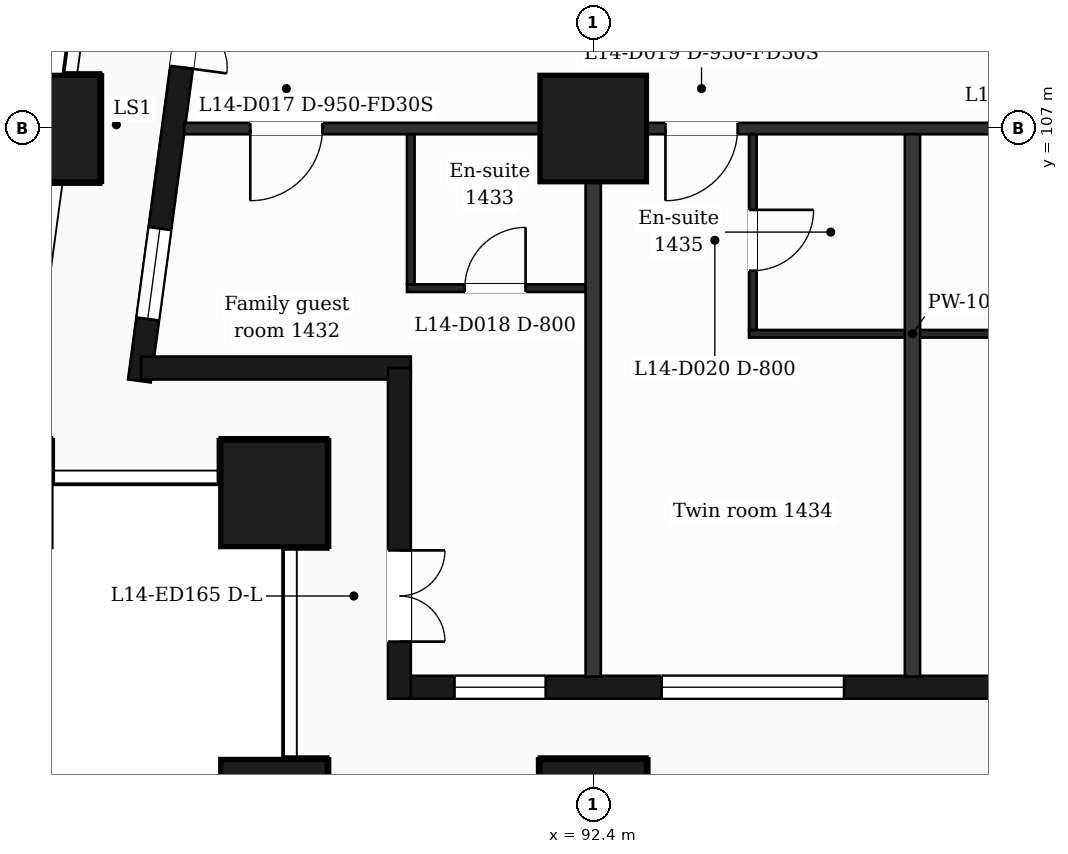
"""IFC4 building model, lengths in metres.
Left out: names, types, materials, properties, quantities, classifications, styles, units other than length and angle.
Written with IfcOpenShell. Run it as: python <this file> out.ifc"""

import sys

from ifc_helpers import new_model, si_unit, direction, frame, frame_2d, origin, origin_2d, place, context, subcontext, project, spatial, rectangle, extrude, element, fill, save


model = new_model("IFC4")
c1 = context("Model", 3, precision=1e-05, world=origin(), true_north=direction((0.0, 1.0)))
c2 = subcontext(c1, "Body", "Model", "MODEL_VIEW")
j1 = project(units=[si_unit("LENGTHUNIT", "METRE"), si_unit("PLANEANGLEUNIT", "RADIAN")], contexts=[c1])
p1 = place(None, origin())
s1 = spatial("IfcSite", under=j1, at=p1, CompositionType="ELEMENT")
p2 = place(p1, origin())
s2 = spatial("IfcBuilding", under=s1, at=p2, CompositionType="ELEMENT")
p3 = place(p2, frame((0.0, 0.0, 67.0)))
s3 = spatial("IfcBuildingStorey", under=s2, at=p3, CompositionType="ELEMENT", Elevation=67.0)
for number, where, z_axis, x_axis in (
    (1, (92.4, 98.0, 0.0), (0.0, 0.0, 1.0), (1.0, 0.0, 0.0)),
    (2, (88.2, 98.0, 0.0), (0.0, 0.0, 1.0), (1.0, 0.0, 0.0)),
    (3, (88.2, 102.2, 0.0), (0.0, 0.0, 1.0), (1.0, 0.0, 0.0)),
    (4, (92.4, 107.0, 0.0), (0.0, 0.0, 1.0), (1.0, 0.0, 0.0)),
    (5, (85.211, 107.0, 0.0), (0.0, 0.0, 1.0), (1.0, 0.0, 0.0)),
):
    element("IfcColumn", number, at=place(p3, frame(where, z_axis=z_axis, x_axis=x_axis)), inside=s3, PredefinedType="COLUMN", context=c2, shape_type="SweptSolid", body=[
        extrude(rectangle(XDim=1.4, YDim=1.4, at=origin_2d()), origin(), (0.0, 0.0, 1.0), 3.5),
    ])
p4 = place(p3, frame((89.85, 99.65, 0.0), z_axis=(0.0, 0.0, 1.0), x_axis=(1.0, 0.0, 0.0)))
e6 = element("IfcWall", 6, at=p4, inside=s3, PredefinedType="SOLIDWALL", context=c2, shape_type="SweptSolid", body=[
    extrude(rectangle(XDim=47.25, YDim=0.3, at=frame_2d((23.625, 0.0))), origin(), (0.0, 0.0, 1.0), 3.18),
])
p5 = place(p4, frame((0.725, 0.0, 0.9)))
e7 = element("IfcOpeningElement", 7, at=p5, cuts=e6, PredefinedType="OPENING", context=c2, shape_type="SweptSolid", body=[
    extrude(rectangle(XDim=1.2, YDim=2.1, at=frame_2d((0.6, 1.05))), frame((0.0, 0.16, 0.0), z_axis=(0.0, -1.0, 0.0), x_axis=(1.0, 0.0, 0.0)), (0.0, 0.0, 1.0), 0.32),
])
p6 = place(p4, frame((3.45, 0.0, 0.9)))
e8 = element("IfcOpeningElement", 8, at=p6, cuts=e6, PredefinedType="OPENING", context=c2, shape_type="SweptSolid", body=[
    extrude(rectangle(XDim=2.4, YDim=2.1, at=frame_2d((1.2, 1.05))), frame((0.0, 0.16, 0.0), z_axis=(0.0, -1.0, 0.0), x_axis=(1.0, 0.0, 0.0)), (0.0, 0.0, 1.0), 0.32),
])
p7 = place(p4, frame((8.25, 0.0, 0.9)))
e9 = element("IfcOpeningElement", 9, at=p7, cuts=e6, PredefinedType="OPENING", context=c2, shape_type="SweptSolid", body=[
    extrude(rectangle(XDim=1.2, YDim=2.1, at=frame_2d((0.6, 1.05))), frame((0.0, 0.16, 0.0), z_axis=(0.0, -1.0, 0.0), x_axis=(1.0, 0.0, 0.0)), (0.0, 0.0, 1.0), 0.32),
])
p8 = place(p4, frame((12.45, 0.0, 0.9)))
e10 = element("IfcOpeningElement", 10, at=p8, cuts=e6, PredefinedType="OPENING", context=c2, shape_type="SweptSolid", body=[
    extrude(rectangle(XDim=1.2, YDim=2.1, at=frame_2d((0.6, 1.05))), frame((0.0, 0.16, 0.0), z_axis=(0.0, -1.0, 0.0), x_axis=(1.0, 0.0, 0.0)), (0.0, 0.0, 1.0), 0.32),
])
p9 = place(p4, frame((16.05, 0.0, 0.9)))
e11 = element("IfcOpeningElement", 11, at=p9, cuts=e6, PredefinedType="OPENING", context=c2, shape_type="SweptSolid", body=[
    extrude(rectangle(XDim=2.4, YDim=2.1, at=frame_2d((1.2, 1.05))), frame((0.0, 0.16, 0.0), z_axis=(0.0, -1.0, 0.0), x_axis=(1.0, 0.0, 0.0)), (0.0, 0.0, 1.0), 0.32),
])
p10 = place(p4, frame((20.25, 0.0, 0.9)))
e12 = element("IfcOpeningElement", 12, at=p10, cuts=e6, PredefinedType="OPENING", context=c2, shape_type="SweptSolid", body=[
    extrude(rectangle(XDim=2.4, YDim=2.1, at=frame_2d((1.2, 1.05))), frame((0.0, 0.16, 0.0), z_axis=(0.0, -1.0, 0.0), x_axis=(1.0, 0.0, 0.0)), (0.0, 0.0, 1.0), 0.32),
])
p11 = place(p4, frame((25.05, 0.0, 0.0)))
e13 = element("IfcOpeningElement", 13, at=p11, cuts=e6, PredefinedType="OPENING", context=c2, shape_type="SweptSolid", body=[
    extrude(rectangle(XDim=1.2, YDim=2.4, at=frame_2d((0.6, 1.2))), frame((0.0, 0.16, 0.0), z_axis=(0.0, -1.0, 0.0), x_axis=(1.0, 0.0, 0.0)), (0.0, 0.0, 1.0), 0.32),
])
p12 = place(p4, frame((28.65, 0.0, 0.9)))
e14 = element("IfcOpeningElement", 14, at=p12, cuts=e6, PredefinedType="OPENING", context=c2, shape_type="SweptSolid", body=[
    extrude(rectangle(XDim=2.4, YDim=2.1, at=frame_2d((1.2, 1.05))), frame((0.0, 0.16, 0.0), z_axis=(0.0, -1.0, 0.0), x_axis=(1.0, 0.0, 0.0)), (0.0, 0.0, 1.0), 0.32),
])
p13 = place(p4, frame((32.85, 0.0, 0.9)))
e15 = element("IfcOpeningElement", 15, at=p13, cuts=e6, PredefinedType="OPENING", context=c2, shape_type="SweptSolid", body=[
    extrude(rectangle(XDim=2.4, YDim=2.1, at=frame_2d((1.2, 1.05))), frame((0.0, 0.16, 0.0), z_axis=(0.0, -1.0, 0.0), x_axis=(1.0, 0.0, 0.0)), (0.0, 0.0, 1.0), 0.32),
])
p14 = place(p4, frame((37.65, 0.0, 0.9)))
e16 = element("IfcOpeningElement", 16, at=p14, cuts=e6, PredefinedType="OPENING", context=c2, shape_type="SweptSolid", body=[
    extrude(rectangle(XDim=1.2, YDim=2.1, at=frame_2d((0.6, 1.05))), frame((0.0, 0.16, 0.0), z_axis=(0.0, -1.0, 0.0), x_axis=(1.0, 0.0, 0.0)), (0.0, 0.0, 1.0), 0.32),
])
p15 = place(p4, frame((41.85, 0.0, 0.9)))
e17 = element("IfcOpeningElement", 17, at=p15, cuts=e6, PredefinedType="OPENING", context=c2, shape_type="SweptSolid", body=[
    extrude(rectangle(XDim=1.2, YDim=2.1, at=frame_2d((0.6, 1.05))), frame((0.0, 0.16, 0.0), z_axis=(0.0, -1.0, 0.0), x_axis=(1.0, 0.0, 0.0)), (0.0, 0.0, 1.0), 0.32),
])
p16 = place(p4, frame((45.25, 0.0, 0.9)))
e18 = element("IfcOpeningElement", 18, at=p16, cuts=e6, PredefinedType="OPENING", context=c2, shape_type="SweptSolid", body=[
    extrude(rectangle(XDim=1.2, YDim=2.1, at=frame_2d((0.6, 1.05))), frame((0.0, 0.16, 0.0), z_axis=(0.0, -1.0, 0.0), x_axis=(1.0, 0.0, 0.0)), (0.0, 0.0, 1.0), 0.32),
])
p17 = place(p3, frame((87.334, 110.4, 0.0), z_axis=(0.0, 0.0, 1.0), x_axis=(-0.133437175554, -0.991057273915, 0.0)))
e19 = element("IfcWall", 19, at=p17, inside=s3, PredefinedType="SOLIDWALL", context=c2, shape_type="SweptSolid", body=[
    extrude(rectangle(XDim=6.781, YDim=0.3, at=frame_2d((3.39, 0.0))), origin(), (0.0, 0.0, 1.0), 3.18),
])
p18 = place(p17, frame((1.418, 0.0, 0.0)))
e20 = element("IfcOpeningElement", 20, at=p18, cuts=e19, PredefinedType="OPENING", context=c2, shape_type="SweptSolid", body=[
    extrude(rectangle(XDim=1.2, YDim=2.4, at=frame_2d((0.6, 1.2))), frame((0.0, 0.16, 0.0), z_axis=(0.0, -1.0, 0.0), x_axis=(1.0, 0.0, 0.0)), (0.0, 0.0, 1.0), 0.32),
])
p19 = place(p17, frame((4.758, 0.0, 0.9)))
e21 = element("IfcOpeningElement", 21, at=p19, cuts=e19, PredefinedType="OPENING", context=c2, shape_type="SweptSolid", body=[
    extrude(rectangle(XDim=1.2, YDim=2.1, at=frame_2d((0.6, 1.05))), frame((0.0, 0.16, 0.0), z_axis=(0.0, -1.0, 0.0), x_axis=(1.0, 0.0, 0.0)), (0.0, 0.0, 1.0), 0.32),
])
p20 = place(p3, frame((86.452, 103.85, 0.0), z_axis=(0.0, 0.0, 1.0), x_axis=(1.0, 0.0, 0.0)))
e22 = element("IfcWall", 22, at=p20, inside=s3, PredefinedType="SOLIDWALL", context=c2, shape_type="SweptSolid", body=[
    extrude(rectangle(XDim=3.548, YDim=0.3, at=frame_2d((1.774, 0.0))), origin(), (0.0, 0.0, 1.0), 3.18),
])
p21 = place(p3, frame((89.85, 103.85, 0.0), z_axis=(0.0, 0.0, 1.0), x_axis=(0.0, -1.0, 0.0)))
e23 = element("IfcWall", 23, at=p21, inside=s3, PredefinedType="SOLIDWALL", context=c2, shape_type="SweptSolid", body=[
    extrude(rectangle(XDim=4.35, YDim=0.3, at=frame_2d((2.175, 0.0))), origin(), (0.0, 0.0, 1.0), 3.18),
])
p22 = place(p21, frame((2.4, 0.0, 0.0)))
e24 = element("IfcOpeningElement", 24, at=p22, cuts=e23, PredefinedType="OPENING", context=c2, shape_type="SweptSolid", body=[
    extrude(rectangle(XDim=1.2, YDim=2.4, at=frame_2d((0.6, 1.2))), frame((0.0, 0.16, 0.0), z_axis=(0.0, -1.0, 0.0), x_axis=(1.0, 0.0, 0.0)), (0.0, 0.0, 1.0), 0.32),
])
p23 = place(p3, frame((94.45, 104.3, 0.0), z_axis=(0.0, 0.0, 1.0), x_axis=(1.0, 0.0, 0.0)))
e25 = element("IfcWall", 25, at=p23, inside=s3, PredefinedType="PARTITIONING", context=c2, shape_type="SweptSolid", body=[
    extrude(rectangle(XDim=4.3, YDim=0.1, at=frame_2d((2.15, 0.0))), origin(), (0.0, 0.0, 1.0), 3.18),
])
p24 = place(p3, frame((89.95, 104.9, 0.0), z_axis=(0.0, 0.0, 1.0), x_axis=(1.0, 0.0, 0.0)))
e26 = element("IfcWall", 26, at=p24, inside=s3, PredefinedType="PARTITIONING", context=c2, shape_type="SweptSolid", body=[
    extrude(rectangle(XDim=2.45, YDim=0.1, at=frame_2d((1.225, 0.0))), origin(), (0.0, 0.0, 1.0), 3.18),
])
p25 = place(p24, frame((0.76, 0.0, 0.0)))
e27 = element("IfcOpeningElement", 27, at=p25, cuts=e26, PredefinedType="OPENING", context=c2, shape_type="SweptSolid", body=[
    extrude(rectangle(XDim=0.8, YDim=2.1, at=frame_2d((0.4, 1.05))), frame((0.0, 0.06, 0.0), z_axis=(0.0, -1.0, 0.0), x_axis=(1.0, 0.0, 0.0)), (0.0, 0.0, 1.0), 0.12),
])
p26 = place(p3, frame((87.018, 107.0, 0.0), z_axis=(0.0, 0.0, 1.0), x_axis=(1.0, 0.0, 0.0)))
e28 = element("IfcWall", 28, at=p26, inside=s3, PredefinedType="PARTITIONING", context=c2, shape_type="SweptSolid", body=[
    extrude(rectangle(XDim=52.765, YDim=0.15, at=frame_2d((26.382, 0.0))), origin(), (0.0, 0.0, 1.0), 3.18),
])
p27 = place(p26, frame((0.87, 0.0, 0.0)))
e29 = element("IfcOpeningElement", 29, at=p27, cuts=e28, PredefinedType="OPENING", context=c2, shape_type="SweptSolid", body=[
    extrude(rectangle(XDim=0.95, YDim=2.1, at=frame_2d((0.475, 1.05))), frame((0.0, 0.085, 0.0), z_axis=(0.0, -1.0, 0.0), x_axis=(1.0, 0.0, 0.0)), (0.0, 0.0, 1.0), 0.17),
])
p28 = place(p26, frame((6.332, 0.0, 0.0)))
e30 = element("IfcOpeningElement", 30, at=p28, cuts=e28, PredefinedType="OPENING", context=c2, shape_type="SweptSolid", body=[
    extrude(rectangle(XDim=0.95, YDim=2.1, at=frame_2d((0.475, 1.05))), frame((0.0, 0.085, 0.0), z_axis=(0.0, -1.0, 0.0), x_axis=(1.0, 0.0, 0.0)), (0.0, 0.0, 1.0), 0.17),
])
p29 = place(p26, frame((11.882, 0.0, 0.0)))
e31 = element("IfcOpeningElement", 31, at=p29, cuts=e28, PredefinedType="OPENING", context=c2, shape_type="SweptSolid", body=[
    extrude(rectangle(XDim=0.95, YDim=2.1, at=frame_2d((0.475, 1.05))), frame((0.0, 0.085, 0.0), z_axis=(0.0, -1.0, 0.0), x_axis=(1.0, 0.0, 0.0)), (0.0, 0.0, 1.0), 0.17),
])
p30 = place(p26, frame((16.757, 0.0, 0.0)))
e32 = element("IfcOpeningElement", 32, at=p30, cuts=e28, PredefinedType="OPENING", context=c2, shape_type="SweptSolid", body=[
    extrude(rectangle(XDim=0.95, YDim=2.1, at=frame_2d((0.475, 1.05))), frame((0.0, 0.085, 0.0), z_axis=(0.0, -1.0, 0.0), x_axis=(1.0, 0.0, 0.0)), (0.0, 0.0, 1.0), 0.17),
])
p31 = place(p26, frame((20.319, 0.0, 0.0)))
e33 = element("IfcOpeningElement", 33, at=p31, cuts=e28, PredefinedType="OPENING", context=c2, shape_type="SweptSolid", body=[
    extrude(rectangle(XDim=0.95, YDim=2.1, at=frame_2d((0.475, 1.05))), frame((0.0, 0.085, 0.0), z_axis=(0.0, -1.0, 0.0), x_axis=(1.0, 0.0, 0.0)), (0.0, 0.0, 1.0), 0.17),
])
p32 = place(p26, frame((23.132, 0.0, 0.0)))
e34 = element("IfcOpeningElement", 34, at=p32, cuts=e28, PredefinedType="OPENING", context=c2, shape_type="SweptSolid", body=[
    extrude(rectangle(XDim=0.95, YDim=2.1, at=frame_2d((0.475, 1.05))), frame((0.0, 0.085, 0.0), z_axis=(0.0, -1.0, 0.0), x_axis=(1.0, 0.0, 0.0)), (0.0, 0.0, 1.0), 0.17),
])
p33 = place(p26, frame((26.657, 0.0, 0.0)))
e35 = element("IfcOpeningElement", 35, at=p33, cuts=e28, PredefinedType="OPENING", context=c2, shape_type="SweptSolid", body=[
    extrude(rectangle(XDim=0.95, YDim=2.1, at=frame_2d((0.475, 1.05))), frame((0.0, 0.085, 0.0), z_axis=(0.0, -1.0, 0.0), x_axis=(1.0, 0.0, 0.0)), (0.0, 0.0, 1.0), 0.17),
])
p34 = place(p26, frame((34.952, 0.0, 0.0)))
e36 = element("IfcOpeningElement", 36, at=p34, cuts=e28, PredefinedType="OPENING", context=c2, shape_type="SweptSolid", body=[
    extrude(rectangle(XDim=1.0, YDim=2.1, at=frame_2d((0.5, 1.05))), frame((0.0, 0.085, 0.0), z_axis=(0.0, -1.0, 0.0), x_axis=(1.0, 0.0, 0.0)), (0.0, 0.0, 1.0), 0.17),
])
p35 = place(p26, frame((45.062, 0.0, 0.0)))
e37 = element("IfcOpeningElement", 37, at=p35, cuts=e28, PredefinedType="OPENING", context=c2, shape_type="SweptSolid", body=[
    extrude(rectangle(XDim=0.95, YDim=2.1, at=frame_2d((0.475, 1.05))), frame((0.0, 0.085, 0.0), z_axis=(0.0, -1.0, 0.0), x_axis=(1.0, 0.0, 0.0)), (0.0, 0.0, 1.0), 0.17),
])
p36 = place(p26, frame((49.285, 0.0, 0.0)))
e38 = element("IfcOpeningElement", 38, at=p36, cuts=e28, PredefinedType="OPENING", context=c2, shape_type="SweptSolid", body=[
    extrude(rectangle(XDim=0.95, YDim=2.1, at=frame_2d((0.475, 1.05))), frame((0.0, 0.085, 0.0), z_axis=(0.0, -1.0, 0.0), x_axis=(1.0, 0.0, 0.0)), (0.0, 0.0, 1.0), 0.17),
])
p37 = place(p3, frame((90.0, 104.95, 0.0), z_axis=(0.0, 0.0, 1.0), x_axis=(0.0, 1.0, 0.0)))
e39 = element("IfcWall", 39, at=p37, inside=s3, PredefinedType="PARTITIONING", context=c2, shape_type="SweptSolid", body=[
    extrude(rectangle(XDim=1.975, YDim=0.1, at=frame_2d((0.988, 0.0))), origin(), (0.0, 0.0, 1.0), 3.18),
])
p38 = place(p3, frame((92.4, 99.79, 0.0), z_axis=(0.0, 0.0, 1.0), x_axis=(0.0, 1.0, 0.0)))
e40 = element("IfcWall", 40, at=p38, inside=s3, PredefinedType="PARTITIONING", context=c2, shape_type="SweptSolid", body=[
    extrude(rectangle(XDim=7.135, YDim=0.2, at=frame_2d((3.567, 0.0))), origin(), (0.0, 0.0, 1.0), 3.18),
])
p39 = place(p3, frame((94.5, 104.35, 0.0), z_axis=(0.0, 0.0, 1.0), x_axis=(0.0, 1.0, 0.0)))
e41 = element("IfcWall", 41, at=p39, inside=s3, PredefinedType="PARTITIONING", context=c2, shape_type="SweptSolid", body=[
    extrude(rectangle(XDim=2.575, YDim=0.1, at=frame_2d((1.288, 0.0))), origin(), (0.0, 0.0, 1.0), 3.18),
])
p40 = place(p39, frame((0.78, 0.0, 0.0)))
e42 = element("IfcOpeningElement", 42, at=p40, cuts=e41, PredefinedType="OPENING", context=c2, shape_type="SweptSolid", body=[
    extrude(rectangle(XDim=0.8, YDim=2.1, at=frame_2d((0.4, 1.05))), frame((0.0, 0.06, 0.0), z_axis=(0.0, -1.0, 0.0), x_axis=(1.0, 0.0, 0.0)), (0.0, 0.0, 1.0), 0.12),
])
p41 = place(p3, frame((96.6, 99.79, 0.0), z_axis=(0.0, 0.0, 1.0), x_axis=(0.0, 1.0, 0.0)))
e43 = element("IfcWall", 43, at=p41, inside=s3, PredefinedType="PARTITIONING", context=c2, shape_type="SweptSolid", body=[
    extrude(rectangle(XDim=7.135, YDim=0.2, at=frame_2d((3.567, 0.0))), origin(), (0.0, 0.0, 1.0), 3.18),
])
p42 = place(p5, origin())
e44 = element("IfcWindow", 44, at=p42, inside=s3, PartitioningType="SINGLE_PANEL", PredefinedType="WINDOW", context=c2, shape_type="SweptSolid", body=[
    extrude(rectangle(XDim=1.2, YDim=2.1, at=frame_2d((0.6, 1.05))), frame((0.0, 0.03, 0.0), z_axis=(0.0, -1.0, 0.0), x_axis=(1.0, 0.0, 0.0)), (0.0, 0.0, 1.0), 0.06),
])
fill(e7, e44)
p43 = place(p6, origin())
e45 = element("IfcWindow", 45, at=p43, inside=s3, PartitioningType="SINGLE_PANEL", PredefinedType="WINDOW", context=c2, shape_type="SweptSolid", body=[
    extrude(rectangle(XDim=2.4, YDim=2.1, at=frame_2d((1.2, 1.05))), frame((0.0, 0.03, 0.0), z_axis=(0.0, -1.0, 0.0), x_axis=(1.0, 0.0, 0.0)), (0.0, 0.0, 1.0), 0.06),
])
fill(e8, e45)
p44 = place(p18, origin())
e46 = element("IfcDoor", 46, at=p44, inside=s3, OperationType="DOUBLE_DOOR_SINGLE_SWING", PredefinedType="DOOR", context=c2, shape_type="SweptSolid", body=[
    extrude(rectangle(XDim=1.2, YDim=2.4, at=frame_2d((0.6, 1.2))), frame((0.0, 0.025, 0.0), z_axis=(0.0, -1.0, 0.0), x_axis=(1.0, 0.0, 0.0)), (0.0, 0.0, 1.0), 0.05),
])
fill(e20, e46)
p45 = place(p19, origin())
e47 = element("IfcWindow", 47, at=p45, inside=s3, PartitioningType="SINGLE_PANEL", PredefinedType="WINDOW", context=c2, shape_type="SweptSolid", body=[
    extrude(rectangle(XDim=1.2, YDim=2.1, at=frame_2d((0.6, 1.05))), frame((0.0, 0.03, 0.0), z_axis=(0.0, -1.0, 0.0), x_axis=(1.0, 0.0, 0.0)), (0.0, 0.0, 1.0), 0.06),
])
fill(e21, e47)
p46 = place(p22, origin())
e48 = element("IfcDoor", 48, at=p46, inside=s3, OperationType="DOUBLE_DOOR_SINGLE_SWING", PredefinedType="DOOR", context=c2, shape_type="SweptSolid", body=[
    extrude(rectangle(XDim=1.2, YDim=2.4, at=frame_2d((0.6, 1.2))), frame((0.0, 0.025, 0.0), z_axis=(0.0, -1.0, 0.0), x_axis=(1.0, 0.0, 0.0)), (0.0, 0.0, 1.0), 0.05),
])
fill(e24, e48)
p47 = place(p27, origin())
e49 = element("IfcDoor", 49, at=p47, inside=s3, OperationType="SINGLE_SWING_LEFT", PredefinedType="DOOR", context=c2, shape_type="SweptSolid", body=[
    extrude(rectangle(XDim=0.95, YDim=2.1, at=frame_2d((0.475, 1.05))), frame((0.0, 0.025, 0.0), z_axis=(0.0, -1.0, 0.0), x_axis=(1.0, 0.0, 0.0)), (0.0, 0.0, 1.0), 0.05),
])
fill(e29, e49)
p48 = place(p25, origin())
e50 = element("IfcDoor", 50, at=p48, inside=s3, OperationType="SINGLE_SWING_RIGHT", PredefinedType="DOOR", context=c2, shape_type="SweptSolid", body=[
    extrude(rectangle(XDim=0.8, YDim=2.1, at=frame_2d((0.4, 1.05))), frame((0.0, 0.025, 0.0), z_axis=(0.0, -1.0, 0.0), x_axis=(1.0, 0.0, 0.0)), (0.0, 0.0, 1.0), 0.05),
])
fill(e27, e50)
p49 = place(p28, origin())
e51 = element("IfcDoor", 51, at=p49, inside=s3, OperationType="SINGLE_SWING_LEFT", PredefinedType="DOOR", context=c2, shape_type="SweptSolid", body=[
    extrude(rectangle(XDim=0.95, YDim=2.1, at=frame_2d((0.475, 1.05))), frame((0.0, 0.025, 0.0), z_axis=(0.0, -1.0, 0.0), x_axis=(1.0, 0.0, 0.0)), (0.0, 0.0, 1.0), 0.05),
])
fill(e30, e51)
p50 = place(p40, origin())
e52 = element("IfcDoor", 52, at=p50, inside=s3, OperationType="SINGLE_SWING_RIGHT", PredefinedType="DOOR", context=c2, shape_type="SweptSolid", body=[
    extrude(rectangle(XDim=0.8, YDim=2.1, at=frame_2d((0.4, 1.05))), frame((0.0, 0.025, 0.0), z_axis=(0.0, -1.0, 0.0), x_axis=(1.0, 0.0, 0.0)), (0.0, 0.0, 1.0), 0.05),
])
fill(e42, e52)
save(model, sys.argv[1])
